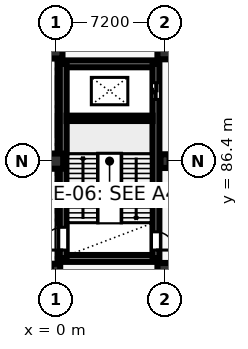
"""IFC4 building model, lengths in metres.
Left out: names, types, materials, properties, quantities, classifications, styles, units other than length and angle.
Written with IfcOpenShell. Run it as: python <this file> out.ifc"""

import sys

from ifc_helpers import new_model, si_unit, direction, frame, frame_2d, origin, origin_2d, place, context, subcontext, project, spatial, rectangle, circle, extrude, element, fill, save


model = new_model("IFC4")
c1 = context("Model", 3, precision=1e-05, world=origin(), true_north=direction((0.0, 1.0)))
c2 = subcontext(c1, "Body", "Model", "MODEL_VIEW")
j1 = project(units=[si_unit("LENGTHUNIT", "METRE"), si_unit("PLANEANGLEUNIT", "RADIAN")], contexts=[c1])
p1 = place(None, origin())
s1 = spatial("IfcSite", under=j1, at=p1, CompositionType="ELEMENT")
p2 = place(p1, origin())
s2 = spatial("IfcBuilding", under=s1, at=p2, CompositionType="ELEMENT")
p3 = place(p2, origin())
s3 = spatial("IfcBuildingStorey", under=s2, at=p3, CompositionType="ELEMENT", Elevation=0.0)
p4 = place(p3, frame((0.0, 79.2, 0.0), z_axis=(0.0, 0.0, 1.0), x_axis=(1.0, 0.0, 0.0)))
e1 = element("IfcColumn", 1, at=p4, inside=s3, PredefinedType="COLUMN", context=c2, shape_type="SweptSolid", body=[
    extrude(rectangle(XDim=0.6, YDim=0.9, at=origin_2d()), origin(), (0.0, 0.0, 1.0), 5.4),
])
p5 = place(p3, frame((0.0, 86.4, 0.0), z_axis=(0.0, 0.0, 1.0), x_axis=(1.0, 0.0, 0.0)))
e2 = element("IfcColumn", 2, at=p5, inside=s3, PredefinedType="COLUMN", context=c2, shape_type="SweptSolid", body=[
    extrude(rectangle(XDim=1.0, YDim=1.0, at=origin_2d()), origin(), (0.0, 0.0, 1.0), 5.4),
])
p6 = place(p3, frame((0.0, 93.6, 0.0), z_axis=(0.0, 0.0, 1.0), x_axis=(1.0, 0.0, 0.0)))
e3 = element("IfcColumn", 3, at=p6, inside=s3, PredefinedType="COLUMN", context=c2, shape_type="SweptSolid", body=[
    extrude(rectangle(XDim=0.9, YDim=0.9, at=origin_2d()), origin(), (0.0, 0.0, 1.0), 5.4),
])
p7 = place(p3, frame((7.2, 79.2, 0.0), z_axis=(0.0, 0.0, 1.0), x_axis=(1.0, 0.0, 0.0)))
e4 = element("IfcColumn", 4, at=p7, inside=s3, PredefinedType="COLUMN", context=c2, shape_type="SweptSolid", body=[
    extrude(circle(Radius=0.5, at=origin_2d()), origin(), (0.0, 0.0, 1.0), 5.4),
])
p8 = place(p3, frame((7.2, 86.4, 0.0), z_axis=(0.0, 0.0, 1.0), x_axis=(1.0, 0.0, 0.0)))
e5 = element("IfcColumn", 5, at=p8, inside=s3, PredefinedType="COLUMN", context=c2, shape_type="SweptSolid", body=[
    extrude(rectangle(XDim=0.6, YDim=0.9, at=origin_2d()), origin(), (0.0, 0.0, 1.0), 5.4),
])
p9 = place(p3, frame((7.2, 93.6, 0.0), z_axis=(0.0, 0.0, 1.0), x_axis=(1.0, 0.0, 0.0)))
e6 = element("IfcColumn", 6, at=p9, inside=s3, PredefinedType="COLUMN", context=c2, shape_type="SweptSolid", body=[
    extrude(rectangle(XDim=1.0, YDim=1.0, at=origin_2d()), origin(), (0.0, 0.0, 1.0), 5.4),
])
for number, where, z_axis, x_axis in (
    (7, (0.5, 80.0, 0.0), (0.0, 0.0, 1.0), (1.0, 0.0, 0.0)),
    (8, (0.5, 92.8, 0.0), (0.0, 0.0, 1.0), (1.0, 0.0, 0.0)),
):
    element("IfcWall", number, at=place(p3, frame(where, z_axis=z_axis, x_axis=x_axis)), inside=s3, PredefinedType="SHEAR", context=c2, shape_type="SweptSolid", body=[
        extrude(rectangle(XDim=6.1, YDim=0.45, at=frame_2d((3.05, 0.0))), origin(), (0.0, 0.0, 1.0), 5.06),
    ])
p10 = place(p3, frame((0.5, 80.0, 0.0), z_axis=(0.0, 0.0, 1.0), x_axis=(0.0, 1.0, 0.0)))
e9 = element("IfcWall", 9, at=p10, inside=s3, PredefinedType="SHEAR", context=c2, shape_type="SweptSolid", body=[
    extrude(rectangle(XDim=12.8, YDim=0.45, at=frame_2d((6.4, 0.0))), origin(), (0.0, 0.0, 1.0), 5.06),
])
p11 = place(p10, frame((0.55, 0.0, 0.0)))
e10 = element("IfcOpeningElement", 10, at=p11, cuts=e9, PredefinedType="OPENING", context=c2, shape_type="SweptSolid", body=[
    extrude(rectangle(XDim=1.5, YDim=2.25, at=frame_2d((0.75, 1.125))), frame((0.0, 0.235, 0.0), z_axis=(0.0, -1.0, 0.0), x_axis=(1.0, 0.0, 0.0)), (0.0, 0.0, 1.0), 0.47),
])
p12 = place(p3, frame((6.6, 80.0, 0.0), z_axis=(0.0, 0.0, 1.0), x_axis=(0.0, 1.0, 0.0)))
e11 = element("IfcWall", 11, at=p12, inside=s3, PredefinedType="SHEAR", context=c2, shape_type="SweptSolid", body=[
    extrude(rectangle(XDim=12.8, YDim=0.45, at=frame_2d((6.4, 0.0))), origin(), (0.0, 0.0, 1.0), 5.06),
])
p13 = place(p12, frame((0.55, 0.0, 0.0)))
e12 = element("IfcOpeningElement", 12, at=p13, cuts=e11, PredefinedType="OPENING", context=c2, shape_type="SweptSolid", body=[
    extrude(rectangle(XDim=1.2, YDim=2.25, at=frame_2d((0.6, 1.125))), frame((0.0, 0.235, 0.0), z_axis=(0.0, -1.0, 0.0), x_axis=(1.0, 0.0, 0.0)), (0.0, 0.0, 1.0), 0.47),
])
p14 = place(p12, frame((10.458, 0.0, 0.0)))
e13 = element("IfcOpeningElement", 13, at=p14, cuts=e11, PredefinedType="OPENING", context=c2, shape_type="SweptSolid", body=[
    extrude(rectangle(XDim=1.1, YDim=2.2, at=frame_2d((0.55, 1.1))), frame((0.0, 0.235, 0.0), z_axis=(0.0, -1.0, 0.0), x_axis=(1.0, 0.0, 0.0)), (0.0, 0.0, 1.0), 0.47),
])
p15 = place(p3, frame((0.725, 89.216, 0.0), z_axis=(0.0, 0.0, 1.0), x_axis=(1.0, 0.0, 0.0)))
e14 = element("IfcWall", 14, at=p15, inside=s3, PredefinedType="SHEAR", context=c2, shape_type="SweptSolid", body=[
    extrude(rectangle(XDim=5.65, YDim=0.35, at=frame_2d((2.825, 0.0))), origin(), (0.0, 0.0, 1.0), 5.06),
])
p16 = place(p13, frame((1.2, 0.0, 0.0), z_axis=(0.0, 0.0, 1.0), x_axis=(-1.0, 0.0, 0.0)))
e15 = element("IfcDoor", 15, at=p16, inside=s3, OperationType="SINGLE_SWING_LEFT", PredefinedType="DOOR", context=c2, shape_type="SweptSolid", body=[
    extrude(rectangle(XDim=1.2, YDim=2.25, at=frame_2d((0.6, 1.125))), frame((0.0, 0.025, 0.0), z_axis=(0.0, -1.0, 0.0), x_axis=(1.0, 0.0, 0.0)), (0.0, 0.0, 1.0), 0.05),
])
fill(e12, e15)
p17 = place(p11, origin())
e16 = element("IfcDoor", 16, at=p17, inside=s3, OperationType="SINGLE_SWING_LEFT", PredefinedType="DOOR", context=c2, shape_type="SweptSolid", body=[
    extrude(rectangle(XDim=1.5, YDim=2.25, at=frame_2d((0.75, 1.125))), frame((0.0, 0.025, 0.0), z_axis=(0.0, -1.0, 0.0), x_axis=(1.0, 0.0, 0.0)), (0.0, 0.0, 1.0), 0.05),
])
fill(e10, e16)
p18 = place(p14, origin())
e17 = element("IfcDoor", 17, at=p18, inside=s3, OperationType="SLIDING_TO_RIGHT", PredefinedType="DOOR", context=c2, shape_type="SweptSolid", body=[
    extrude(rectangle(XDim=1.1, YDim=2.2, at=frame_2d((0.55, 1.1))), frame((0.0, 0.025, 0.0), z_axis=(0.0, -1.0, 0.0), x_axis=(1.0, 0.0, 0.0)), (0.0, 0.0, 1.0), 0.05),
])
fill(e13, e17)
save(model, sys.argv[1])
